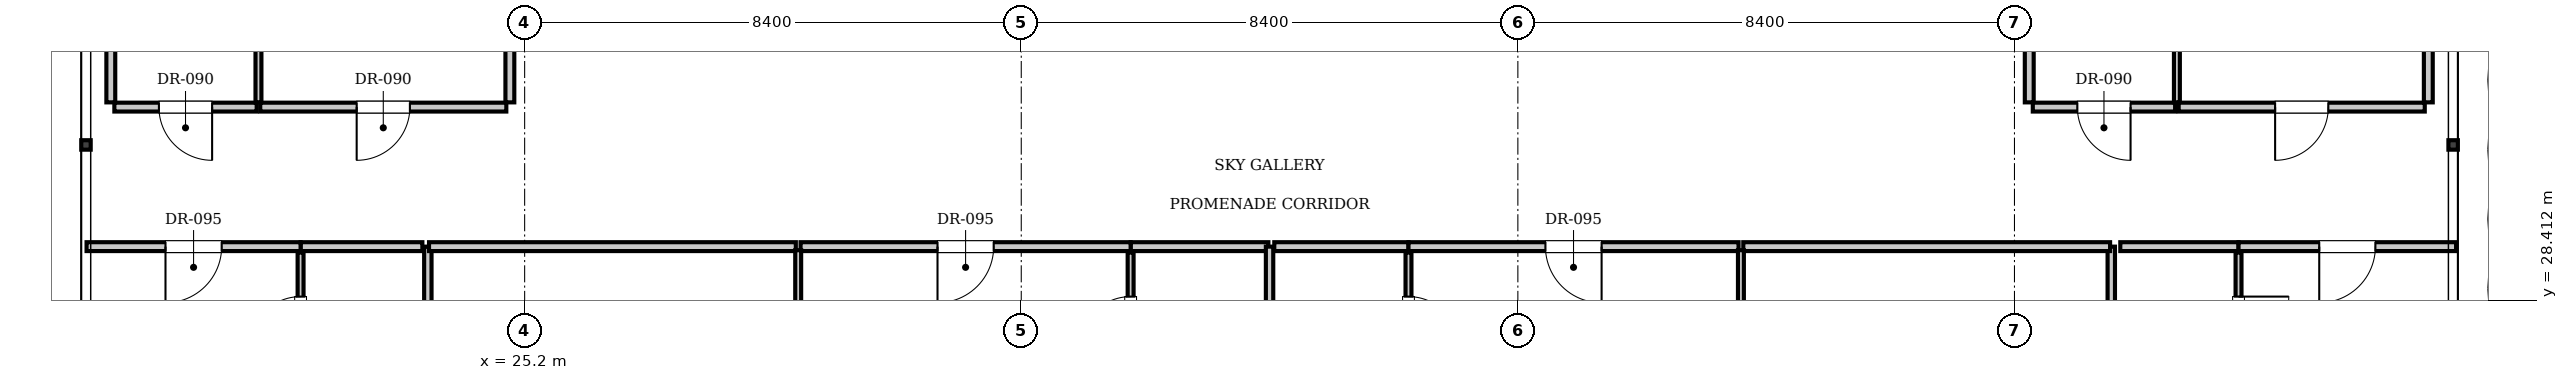
"""IFC4 building model, lengths in metres.
Left out: names, types, materials, properties, quantities, classifications, styles, units other than length and angle.
Written with IfcOpenShell. Run it as: python <this file> out.ifc"""

import sys

from ifc_helpers import new_model, si_unit, direction, frame, frame_2d, origin, place, context, subcontext, project, spatial, rectangle, extrude, element, fill, save


model = new_model("IFC4")
c1 = context("Model", 3, precision=1e-05, world=origin(), true_north=direction((0.0, 1.0)))
c2 = subcontext(c1, "Body", "Model", "MODEL_VIEW")
j1 = project(units=[si_unit("LENGTHUNIT", "METRE"), si_unit("PLANEANGLEUNIT", "RADIAN")], contexts=[c1])
p1 = place(None, origin())
s1 = spatial("IfcSite", under=j1, at=p1, CompositionType="ELEMENT")
p2 = place(p1, origin())
s2 = spatial("IfcBuilding", under=s1, at=p2, CompositionType="ELEMENT")
p3 = place(p2, frame((0.0, 0.0, 337.4)))
s3 = spatial("IfcBuildingStorey", under=s2, at=p3, CompositionType="ELEMENT", Elevation=337.4)
p4 = place(p3, frame((18.2, 31.76, 0.0), z_axis=(0.0, 0.0, 1.0), x_axis=(0.0, 1.0, 0.0)))
e1 = element("IfcWall", 1, at=p4, inside=s3, PredefinedType="PARTITIONING", context=c2, shape_type="SweptSolid", body=[
    extrude(rectangle(XDim=16.285, YDim=0.15, at=frame_2d((8.143, 0.0))), origin(), (0.0, 0.0, 1.0), 3.141),
])
p5 = place(p3, frame((24.95, 31.76, 0.0), z_axis=(0.0, 0.0, 1.0), x_axis=(0.0, 1.0, 0.0)))
e2 = element("IfcWall", 2, at=p5, inside=s3, PredefinedType="PARTITIONING", context=c2, shape_type="SweptSolid", body=[
    extrude(rectangle(XDim=16.285, YDim=0.15, at=frame_2d((8.143, 0.0))), origin(), (0.0, 0.0, 1.0), 3.61),
])
p6 = place(p3, frame((18.26, 31.68, 0.0), z_axis=(0.0, 0.0, 1.0), x_axis=(1.0, 0.0, 0.0)))
e3 = element("IfcWall", 3, at=p6, inside=s3, PredefinedType="PARTITIONING", context=c2, shape_type="SweptSolid", body=[
    extrude(rectangle(XDim=2.407, YDim=0.15, at=frame_2d((1.204, 0.0))), origin(), (0.0, 0.0, 1.0), 3.61),
])
p7 = place(p6, frame((0.754, 0.0, 0.0)))
e4 = element("IfcOpeningElement", 4, at=p7, cuts=e3, PredefinedType="OPENING", context=c2, shape_type="SweptSolid", body=[
    extrude(rectangle(XDim=0.9, YDim=2.1, at=frame_2d((0.45, 1.05))), frame((0.0, 0.085, 0.0), z_axis=(0.0, -1.0, 0.0), x_axis=(1.0, 0.0, 0.0)), (0.0, 0.0, 1.0), 0.17),
])
p8 = place(p3, frame((20.698, 31.76, 0.0), z_axis=(0.0, 0.0, 1.0), x_axis=(0.0, 1.0, 0.0)))
e5 = element("IfcWall", 5, at=p8, inside=s3, PredefinedType="PARTITIONING", context=c2, shape_type="SweptSolid", body=[
    extrude(rectangle(XDim=16.285, YDim=0.1, at=frame_2d((8.143, 0.0))), origin(), (0.0, 0.0, 1.0), 3.61),
])
p9 = place(p3, frame((20.728, 31.68, 0.0), z_axis=(0.0, 0.0, 1.0), x_axis=(1.0, 0.0, 0.0)))
e6 = element("IfcWall", 6, at=p9, inside=s3, PredefinedType="PARTITIONING", context=c2, shape_type="SweptSolid", body=[
    extrude(rectangle(XDim=4.162, YDim=0.15, at=frame_2d((2.081, 0.0))), origin(), (0.0, 0.0, 1.0), 3.61),
])
p10 = place(p9, frame((1.631, 0.0, 0.0)))
e7 = element("IfcOpeningElement", 7, at=p10, cuts=e6, PredefinedType="OPENING", context=c2, shape_type="SweptSolid", body=[
    extrude(rectangle(XDim=0.9, YDim=2.1, at=frame_2d((0.45, 1.05))), frame((0.0, 0.085, 0.0), z_axis=(0.0, -1.0, 0.0), x_axis=(1.0, 0.0, 0.0)), (0.0, 0.0, 1.0), 0.17),
])
p11 = place(p3, frame((50.65, 31.76, 0.0), z_axis=(0.0, 0.0, 1.0), x_axis=(0.0, 1.0, 0.0)))
e8 = element("IfcWall", 8, at=p11, inside=s3, PredefinedType="PARTITIONING", context=c2, shape_type="SweptSolid", body=[
    extrude(rectangle(XDim=16.285, YDim=0.15, at=frame_2d((8.143, 0.0))), origin(), (0.0, 0.0, 1.0), 3.61),
])
p12 = place(p3, frame((57.4, 31.76, 0.0), z_axis=(0.0, 0.0, 1.0), x_axis=(0.0, 1.0, 0.0)))
e9 = element("IfcWall", 9, at=p12, inside=s3, PredefinedType="PARTITIONING", context=c2, shape_type="SweptSolid", body=[
    extrude(rectangle(XDim=16.285, YDim=0.15, at=frame_2d((8.143, 0.0))), origin(), (0.0, 0.0, 1.0), 3.141),
])
p13 = place(p3, frame((50.71, 31.68, 0.0), z_axis=(0.0, 0.0, 1.0), x_axis=(1.0, 0.0, 0.0)))
e10 = element("IfcWall", 10, at=p13, inside=s3, PredefinedType="PARTITIONING", context=c2, shape_type="SweptSolid", body=[
    extrude(rectangle(XDim=2.407, YDim=0.15, at=frame_2d((1.204, 0.0))), origin(), (0.0, 0.0, 1.0), 3.61),
])
p14 = place(p13, frame((0.754, 0.0, 0.0)))
e11 = element("IfcOpeningElement", 11, at=p14, cuts=e10, PredefinedType="OPENING", context=c2, shape_type="SweptSolid", body=[
    extrude(rectangle(XDim=0.9, YDim=2.1, at=frame_2d((0.45, 1.05))), frame((0.0, 0.085, 0.0), z_axis=(0.0, -1.0, 0.0), x_axis=(1.0, 0.0, 0.0)), (0.0, 0.0, 1.0), 0.17),
])
p15 = place(p3, frame((53.147, 31.76, 0.0), z_axis=(0.0, 0.0, 1.0), x_axis=(0.0, 1.0, 0.0)))
e12 = element("IfcWall", 12, at=p15, inside=s3, PredefinedType="PARTITIONING", context=c2, shape_type="SweptSolid", body=[
    extrude(rectangle(XDim=16.285, YDim=0.1, at=frame_2d((8.143, 0.0))), origin(), (0.0, 0.0, 1.0), 3.61),
])
p16 = place(p3, frame((53.177, 31.68, 0.0), z_axis=(0.0, 0.0, 1.0), x_axis=(1.0, 0.0, 0.0)))
e13 = element("IfcWall", 13, at=p16, inside=s3, PredefinedType="PARTITIONING", context=c2, shape_type="SweptSolid", body=[
    extrude(rectangle(XDim=4.163, YDim=0.15, at=frame_2d((2.081, 0.0))), origin(), (0.0, 0.0, 1.0), 3.61),
])
p17 = place(p16, frame((1.631, 0.0, 0.0)))
e14 = element("IfcOpeningElement", 14, at=p17, cuts=e13, PredefinedType="OPENING", context=c2, shape_type="SweptSolid", body=[
    extrude(rectangle(XDim=0.9, YDim=2.1, at=frame_2d((0.45, 1.05))), frame((0.0, 0.085, 0.0), z_axis=(0.0, -1.0, 0.0), x_axis=(1.0, 0.0, 0.0)), (0.0, 0.0, 1.0), 0.17),
])
for number, where, z_axis, x_axis in (
    (15, (23.562, 19.34, 0.0), (0.0, 0.0, 1.0), (0.0, 1.0, 0.0)),
    (16, (52.038, 19.34, 0.0), (0.0, 0.0, 1.0), (0.0, 1.0, 0.0)),
):
    element("IfcWall", number, at=place(p3, frame(where, z_axis=z_axis, x_axis=x_axis)), inside=s3, PredefinedType="PARTITIONING", context=c2, shape_type="SweptSolid", body=[
        extrude(rectangle(XDim=9.98, YDim=0.125, at=frame_2d((4.99, 0.0))), origin(), (0.0, 0.0, 1.0), 3.61),
    ])
p18 = place(p3, frame((35.45, 29.32, 0.0), z_axis=(0.0, 0.0, 1.0), x_axis=(1.0, 0.0, 0.0)))
e17 = element("IfcWall", 17, at=p18, inside=s3, PredefinedType="PARTITIONING", context=c2, shape_type="SweptSolid", body=[
    extrude(rectangle(XDim=2.33, YDim=0.15, at=frame_2d((1.165, 0.0))), origin(), (0.0, 0.0, 1.0), 3.61),
])
p19 = place(p3, frame((35.45, 26.88, 0.0), z_axis=(0.0, 0.0, 1.0), x_axis=(0.0, 1.0, 0.0)))
e18 = element("IfcWall", 18, at=p19, inside=s3, PredefinedType="PARTITIONING", context=c2, shape_type="SweptSolid", body=[
    extrude(rectangle(XDim=2.34, YDim=0.1, at=frame_2d((1.17, 0.0))), origin(), (0.0, 0.0, 1.0), 3.61),
])
p20 = place(p19, frame((0.745, 0.0, 0.0)))
e19 = element("IfcOpeningElement", 19, at=p20, cuts=e18, PredefinedType="OPENING", context=c2, shape_type="SweptSolid", body=[
    extrude(rectangle(XDim=0.85, YDim=2.1, at=frame_2d((0.425, 1.05))), frame((0.0, 0.06, 0.0), z_axis=(0.0, -1.0, 0.0), x_axis=(1.0, 0.0, 0.0)), (0.0, 0.0, 1.0), 0.12),
])
p21 = place(p3, frame((23.583, 29.32, 0.0), z_axis=(0.0, 0.0, 1.0), x_axis=(1.0, 0.0, 0.0)))
e20 = element("IfcWall", 20, at=p21, inside=s3, PredefinedType="PARTITIONING", context=c2, shape_type="SweptSolid", body=[
    extrude(rectangle(XDim=6.205, YDim=0.15, at=frame_2d((3.102, 0.0))), origin(), (0.0, 0.0, 1.0), 3.61),
])
p22 = place(p3, frame((29.867, 29.32, 0.0), z_axis=(0.0, 0.0, 1.0), x_axis=(1.0, 0.0, 0.0)))
e21 = element("IfcWall", 21, at=p22, inside=s3, PredefinedType="PARTITIONING", context=c2, shape_type="SweptSolid", body=[
    extrude(rectangle(XDim=5.583, YDim=0.15, at=frame_2d((2.792, 0.0))), origin(), (0.0, 0.0, 1.0), 3.61),
])
p23 = place(p22, frame((2.316, 0.0, 0.0)))
e22 = element("IfcOpeningElement", 22, at=p23, cuts=e21, PredefinedType="OPENING", context=c2, shape_type="SweptSolid", body=[
    extrude(rectangle(XDim=0.95, YDim=2.15, at=frame_2d((0.475, 1.075))), frame((0.0, 0.085, 0.0), z_axis=(0.0, -1.0, 0.0), x_axis=(1.0, 0.0, 0.0)), (0.0, 0.0, 1.0), 0.17),
])
p24 = place(p3, frame((29.827, 13.83, 0.0), z_axis=(0.0, 0.0, 1.0), x_axis=(0.0, 1.0, 0.0)))
e23 = element("IfcWall", 23, at=p24, inside=s3, PredefinedType="PARTITIONING", context=c2, shape_type="SweptSolid", body=[
    extrude(rectangle(XDim=15.43, YDim=0.1, at=frame_2d((7.715, 0.0))), origin(), (0.0, 0.0, 1.0), 3.61),
])
p25 = place(p24, frame((1.6, 0.0, 0.0)))
e24 = element("IfcOpeningElement", 24, at=p25, cuts=e23, PredefinedType="OPENING", context=c2, shape_type="SweptSolid", body=[
    extrude(rectangle(XDim=0.9, YDim=2.1, at=frame_2d((0.45, 1.05))), frame((0.0, 0.06, 0.0), z_axis=(0.0, -1.0, 0.0), x_axis=(1.0, 0.0, 0.0)), (0.0, 0.0, 1.0), 0.12),
])
p26 = place(p3, frame((37.8, 13.9, 0.0), z_axis=(0.0, 0.0, 1.0), x_axis=(0.0, 1.0, 0.0)))
e25 = element("IfcWall", 25, at=p26, inside=s3, PredefinedType="PARTITIONING", context=c2, shape_type="SweptSolid", body=[
    extrude(rectangle(XDim=15.42, YDim=0.125, at=frame_2d((7.71, 0.0))), origin(), (0.0, 0.0, 1.0), 3.403),
])
p27 = place(p3, frame((37.88, 29.32, 0.0), z_axis=(0.0, 0.0, 1.0), x_axis=(1.0, 0.0, 0.0)))
e26 = element("IfcWall", 26, at=p27, inside=s3, PredefinedType="PARTITIONING", context=c2, shape_type="SweptSolid", body=[
    extrude(rectangle(XDim=2.27, YDim=0.15, at=frame_2d((1.135, 0.0))), origin(), (0.0, 0.0, 1.0), 3.61),
])
p28 = place(p3, frame((40.15, 26.88, 0.0), z_axis=(0.0, 0.0, 1.0), x_axis=(0.0, 1.0, 0.0)))
e27 = element("IfcWall", 27, at=p28, inside=s3, PredefinedType="PARTITIONING", context=c2, shape_type="SweptSolid", body=[
    extrude(rectangle(XDim=2.34, YDim=0.1, at=frame_2d((1.17, 0.0))), origin(), (0.0, 0.0, 1.0), 3.61),
])
p29 = place(p28, frame((0.745, 0.0, 0.0)))
e28 = element("IfcOpeningElement", 28, at=p29, cuts=e27, PredefinedType="OPENING", context=c2, shape_type="SweptSolid", body=[
    extrude(rectangle(XDim=0.85, YDim=2.1, at=frame_2d((0.425, 1.05))), frame((0.0, 0.06, 0.0), z_axis=(0.0, -1.0, 0.0), x_axis=(1.0, 0.0, 0.0)), (0.0, 0.0, 1.0), 0.12),
])
p30 = place(p3, frame((40.15, 29.32, 0.0), z_axis=(0.0, 0.0, 1.0), x_axis=(1.0, 0.0, 0.0)))
e29 = element("IfcWall", 29, at=p30, inside=s3, PredefinedType="PARTITIONING", context=c2, shape_type="SweptSolid", body=[
    extrude(rectangle(XDim=5.583, YDim=0.15, at=frame_2d((2.792, 0.0))), origin(), (0.0, 0.0, 1.0), 3.61),
])
p31 = place(p30, frame((2.316, 0.0, 0.0)))
e30 = element("IfcOpeningElement", 30, at=p31, cuts=e29, PredefinedType="OPENING", context=c2, shape_type="SweptSolid", body=[
    extrude(rectangle(XDim=0.95, YDim=2.15, at=frame_2d((0.475, 1.075))), frame((0.0, 0.085, 0.0), z_axis=(0.0, -1.0, 0.0), x_axis=(1.0, 0.0, 0.0)), (0.0, 0.0, 1.0), 0.17),
])
p32 = place(p3, frame((45.813, 29.32, 0.0), z_axis=(0.0, 0.0, 1.0), x_axis=(1.0, 0.0, 0.0)))
e31 = element("IfcWall", 31, at=p32, inside=s3, PredefinedType="PARTITIONING", context=c2, shape_type="SweptSolid", body=[
    extrude(rectangle(XDim=6.205, YDim=0.15, at=frame_2d((3.102, 0.0))), origin(), (0.0, 0.0, 1.0), 3.61),
])
p33 = place(p3, frame((45.773, 13.83, 0.0), z_axis=(0.0, 0.0, 1.0), x_axis=(0.0, 1.0, 0.0)))
e32 = element("IfcWall", 32, at=p33, inside=s3, PredefinedType="PARTITIONING", context=c2, shape_type="SweptSolid", body=[
    extrude(rectangle(XDim=15.43, YDim=0.1, at=frame_2d((7.715, 0.0))), origin(), (0.0, 0.0, 1.0), 3.61),
])
p34 = place(p33, frame((1.6, 0.0, 0.0)))
e33 = element("IfcOpeningElement", 33, at=p34, cuts=e32, PredefinedType="OPENING", context=c2, shape_type="SweptSolid", body=[
    extrude(rectangle(XDim=0.9, YDim=2.1, at=frame_2d((0.45, 1.05))), frame((0.0, 0.06, 0.0), z_axis=(0.0, -1.0, 0.0), x_axis=(1.0, 0.0, 0.0)), (0.0, 0.0, 1.0), 0.12),
])
p35 = place(p3, frame((21.41, 29.32, 0.0), z_axis=(0.0, 0.0, 1.0), x_axis=(1.0, 0.0, 0.0)))
e34 = element("IfcWall", 34, at=p35, inside=s3, PredefinedType="PARTITIONING", context=c2, shape_type="SweptSolid", body=[
    extrude(rectangle(XDim=2.06, YDim=0.15, at=frame_2d((1.03, 0.0))), origin(), (0.0, 0.0, 1.0), 3.61),
])
p36 = place(p3, frame((21.41, 26.88, 0.0), z_axis=(0.0, 0.0, 1.0), x_axis=(0.0, 1.0, 0.0)))
e35 = element("IfcWall", 35, at=p36, inside=s3, PredefinedType="PARTITIONING", context=c2, shape_type="SweptSolid", body=[
    extrude(rectangle(XDim=2.34, YDim=0.1, at=frame_2d((1.17, 0.0))), origin(), (0.0, 0.0, 1.0), 3.61),
])
p37 = place(p36, frame((0.745, 0.0, 0.0)))
e36 = element("IfcOpeningElement", 36, at=p37, cuts=e35, PredefinedType="OPENING", context=c2, shape_type="SweptSolid", body=[
    extrude(rectangle(XDim=0.85, YDim=2.1, at=frame_2d((0.425, 1.05))), frame((0.0, 0.06, 0.0), z_axis=(0.0, -1.0, 0.0), x_axis=(1.0, 0.0, 0.0)), (0.0, 0.0, 1.0), 0.12),
])
p38 = place(p3, frame((17.79, 29.32, 0.0), z_axis=(0.0, 0.0, 1.0), x_axis=(1.0, 0.0, 0.0)))
e37 = element("IfcWall", 37, at=p38, inside=s3, PredefinedType="PARTITIONING", context=c2, shape_type="SweptSolid", body=[
    extrude(rectangle(XDim=3.62, YDim=0.15, at=frame_2d((1.81, 0.0))), origin(), (0.0, 0.0, 1.0), 3.61),
])
p39 = place(p38, frame((1.335, 0.0, 0.0)))
e38 = element("IfcOpeningElement", 38, at=p39, cuts=e37, PredefinedType="OPENING", context=c2, shape_type="SweptSolid", body=[
    extrude(rectangle(XDim=0.95, YDim=2.15, at=frame_2d((0.475, 1.075))), frame((0.0, 0.085, 0.0), z_axis=(0.0, -1.0, 0.0), x_axis=(1.0, 0.0, 0.0)), (0.0, 0.0, 1.0), 0.17),
])
p40 = place(p3, frame((52.19, 29.32, 0.0), z_axis=(0.0, 0.0, 1.0), x_axis=(1.0, 0.0, 0.0)))
e39 = element("IfcWall", 39, at=p40, inside=s3, PredefinedType="PARTITIONING", context=c2, shape_type="SweptSolid", body=[
    extrude(rectangle(XDim=2.0, YDim=0.15, at=frame_2d((1.0, 0.0))), origin(), (0.0, 0.0, 1.0), 3.61),
])
p41 = place(p3, frame((54.19, 26.88, 0.0), z_axis=(0.0, 0.0, 1.0), x_axis=(0.0, 1.0, 0.0)))
e40 = element("IfcWall", 40, at=p41, inside=s3, PredefinedType="PARTITIONING", context=c2, shape_type="SweptSolid", body=[
    extrude(rectangle(XDim=2.34, YDim=0.1, at=frame_2d((1.17, 0.0))), origin(), (0.0, 0.0, 1.0), 3.61),
])
p42 = place(p41, frame((0.745, 0.0, 0.0)))
e41 = element("IfcOpeningElement", 41, at=p42, cuts=e40, PredefinedType="OPENING", context=c2, shape_type="SweptSolid", body=[
    extrude(rectangle(XDim=0.85, YDim=2.1, at=frame_2d((0.425, 1.05))), frame((0.0, 0.06, 0.0), z_axis=(0.0, -1.0, 0.0), x_axis=(1.0, 0.0, 0.0)), (0.0, 0.0, 1.0), 0.12),
])
p43 = place(p3, frame((54.19, 29.32, 0.0), z_axis=(0.0, 0.0, 1.0), x_axis=(1.0, 0.0, 0.0)))
e42 = element("IfcWall", 42, at=p43, inside=s3, PredefinedType="PARTITIONING", context=c2, shape_type="SweptSolid", body=[
    extrude(rectangle(XDim=3.68, YDim=0.15, at=frame_2d((1.84, 0.0))), origin(), (0.0, 0.0, 1.0), 3.61),
])
p44 = place(p43, frame((1.365, 0.0, 0.0)))
e43 = element("IfcOpeningElement", 43, at=p44, cuts=e42, PredefinedType="OPENING", context=c2, shape_type="SweptSolid", body=[
    extrude(rectangle(XDim=0.95, YDim=2.15, at=frame_2d((0.475, 1.075))), frame((0.0, 0.085, 0.0), z_axis=(0.0, -1.0, 0.0), x_axis=(1.0, 0.0, 0.0)), (0.0, 0.0, 1.0), 0.17),
])
p45 = place(p7, frame((0.9, 0.0, 0.0), z_axis=(0.0, 0.0, 1.0), x_axis=(-1.0, 0.0, 0.0)))
e44 = element("IfcDoor", 44, at=p45, inside=s3, OperationType="SINGLE_SWING_LEFT", PredefinedType="DOOR", context=c2, shape_type="SweptSolid", body=[
    extrude(rectangle(XDim=0.9, YDim=2.1, at=frame_2d((0.45, 1.05))), frame((0.0, 0.025, 0.0), z_axis=(0.0, -1.0, 0.0), x_axis=(1.0, 0.0, 0.0)), (0.0, 0.0, 1.0), 0.05),
])
fill(e4, e44)
p46 = place(p10, frame((0.9, 0.0, 0.0), z_axis=(0.0, 0.0, 1.0), x_axis=(-1.0, 0.0, 0.0)))
e45 = element("IfcDoor", 45, at=p46, inside=s3, OperationType="SINGLE_SWING_RIGHT", PredefinedType="DOOR", context=c2, shape_type="SweptSolid", body=[
    extrude(rectangle(XDim=0.9, YDim=2.1, at=frame_2d((0.45, 1.05))), frame((0.0, 0.025, 0.0), z_axis=(0.0, -1.0, 0.0), x_axis=(1.0, 0.0, 0.0)), (0.0, 0.0, 1.0), 0.05),
])
fill(e7, e45)
p47 = place(p14, frame((0.9, 0.0, 0.0), z_axis=(0.0, 0.0, 1.0), x_axis=(-1.0, 0.0, 0.0)))
e46 = element("IfcDoor", 46, at=p47, inside=s3, OperationType="SINGLE_SWING_LEFT", PredefinedType="DOOR", context=c2, shape_type="SweptSolid", body=[
    extrude(rectangle(XDim=0.9, YDim=2.1, at=frame_2d((0.45, 1.05))), frame((0.0, 0.025, 0.0), z_axis=(0.0, -1.0, 0.0), x_axis=(1.0, 0.0, 0.0)), (0.0, 0.0, 1.0), 0.05),
])
fill(e11, e46)
p48 = place(p17, frame((0.9, 0.0, 0.0), z_axis=(0.0, 0.0, 1.0), x_axis=(-1.0, 0.0, 0.0)))
e47 = element("IfcDoor", 47, at=p48, inside=s3, OperationType="SINGLE_SWING_RIGHT", PredefinedType="DOOR", context=c2, shape_type="SweptSolid", body=[
    extrude(rectangle(XDim=0.9, YDim=2.1, at=frame_2d((0.45, 1.05))), frame((0.0, 0.025, 0.0), z_axis=(0.0, -1.0, 0.0), x_axis=(1.0, 0.0, 0.0)), (0.0, 0.0, 1.0), 0.05),
])
fill(e14, e47)
p49 = place(p20, origin())
e48 = element("IfcDoor", 48, at=p49, inside=s3, OperationType="SINGLE_SWING_LEFT", PredefinedType="DOOR", context=c2, shape_type="SweptSolid", body=[
    extrude(rectangle(XDim=0.85, YDim=2.1, at=frame_2d((0.425, 1.05))), frame((0.0, 0.025, 0.0), z_axis=(0.0, -1.0, 0.0), x_axis=(1.0, 0.0, 0.0)), (0.0, 0.0, 1.0), 0.05),
])
fill(e19, e48)
p50 = place(p23, frame((0.95, 0.0, 0.0), z_axis=(0.0, 0.0, 1.0), x_axis=(-1.0, 0.0, 0.0)))
e49 = element("IfcDoor", 49, at=p50, inside=s3, OperationType="SINGLE_SWING_RIGHT", PredefinedType="DOOR", context=c2, shape_type="SweptSolid", body=[
    extrude(rectangle(XDim=0.95, YDim=2.15, at=frame_2d((0.475, 1.075))), frame((0.0, 0.025, 0.0), z_axis=(0.0, -1.0, 0.0), x_axis=(1.0, 0.0, 0.0)), (0.0, 0.0, 1.0), 0.05),
])
fill(e22, e49)
p51 = place(p29, frame((0.85, 0.0, 0.0), z_axis=(0.0, 0.0, 1.0), x_axis=(-1.0, 0.0, 0.0)))
e50 = element("IfcDoor", 50, at=p51, inside=s3, OperationType="SINGLE_SWING_RIGHT", PredefinedType="DOOR", context=c2, shape_type="SweptSolid", body=[
    extrude(rectangle(XDim=0.85, YDim=2.1, at=frame_2d((0.425, 1.05))), frame((0.0, 0.025, 0.0), z_axis=(0.0, -1.0, 0.0), x_axis=(1.0, 0.0, 0.0)), (0.0, 0.0, 1.0), 0.05),
])
fill(e28, e50)
p52 = place(p31, frame((0.95, 0.0, 0.0), z_axis=(0.0, 0.0, 1.0), x_axis=(-1.0, 0.0, 0.0)))
e51 = element("IfcDoor", 51, at=p52, inside=s3, OperationType="SINGLE_SWING_LEFT", PredefinedType="DOOR", context=c2, shape_type="SweptSolid", body=[
    extrude(rectangle(XDim=0.95, YDim=2.15, at=frame_2d((0.475, 1.075))), frame((0.0, 0.025, 0.0), z_axis=(0.0, -1.0, 0.0), x_axis=(1.0, 0.0, 0.0)), (0.0, 0.0, 1.0), 0.05),
])
fill(e30, e51)
p53 = place(p37, origin())
e52 = element("IfcDoor", 52, at=p53, inside=s3, OperationType="SINGLE_SWING_LEFT", PredefinedType="DOOR", context=c2, shape_type="SweptSolid", body=[
    extrude(rectangle(XDim=0.85, YDim=2.1, at=frame_2d((0.425, 1.05))), frame((0.0, 0.025, 0.0), z_axis=(0.0, -1.0, 0.0), x_axis=(1.0, 0.0, 0.0)), (0.0, 0.0, 1.0), 0.05),
])
fill(e36, e52)
p54 = place(p39, frame((0.95, 0.0, 0.0), z_axis=(0.0, 0.0, 1.0), x_axis=(-1.0, 0.0, 0.0)))
e53 = element("IfcDoor", 53, at=p54, inside=s3, OperationType="SINGLE_SWING_RIGHT", PredefinedType="DOOR", context=c2, shape_type="SweptSolid", body=[
    extrude(rectangle(XDim=0.95, YDim=2.15, at=frame_2d((0.475, 1.075))), frame((0.0, 0.025, 0.0), z_axis=(0.0, -1.0, 0.0), x_axis=(1.0, 0.0, 0.0)), (0.0, 0.0, 1.0), 0.05),
])
fill(e38, e53)
p55 = place(p42, frame((0.85, 0.0, 0.0), z_axis=(0.0, 0.0, 1.0), x_axis=(-1.0, 0.0, 0.0)))
e54 = element("IfcDoor", 54, at=p55, inside=s3, OperationType="SINGLE_SWING_LEFT", PredefinedType="DOOR", context=c2, shape_type="SweptSolid", body=[
    extrude(rectangle(XDim=0.85, YDim=2.1, at=frame_2d((0.425, 1.05))), frame((0.0, 0.025, 0.0), z_axis=(0.0, -1.0, 0.0), x_axis=(1.0, 0.0, 0.0)), (0.0, 0.0, 1.0), 0.05),
])
fill(e41, e54)
p56 = place(p44, frame((0.95, 0.0, 0.0), z_axis=(0.0, 0.0, 1.0), x_axis=(-1.0, 0.0, 0.0)))
e55 = element("IfcDoor", 55, at=p56, inside=s3, OperationType="SINGLE_SWING_RIGHT", PredefinedType="DOOR", context=c2, shape_type="SweptSolid", body=[
    extrude(rectangle(XDim=0.95, YDim=2.15, at=frame_2d((0.475, 1.075))), frame((0.0, 0.025, 0.0), z_axis=(0.0, -1.0, 0.0), x_axis=(1.0, 0.0, 0.0)), (0.0, 0.0, 1.0), 0.05),
])
fill(e43, e55)
save(model, sys.argv[1])
